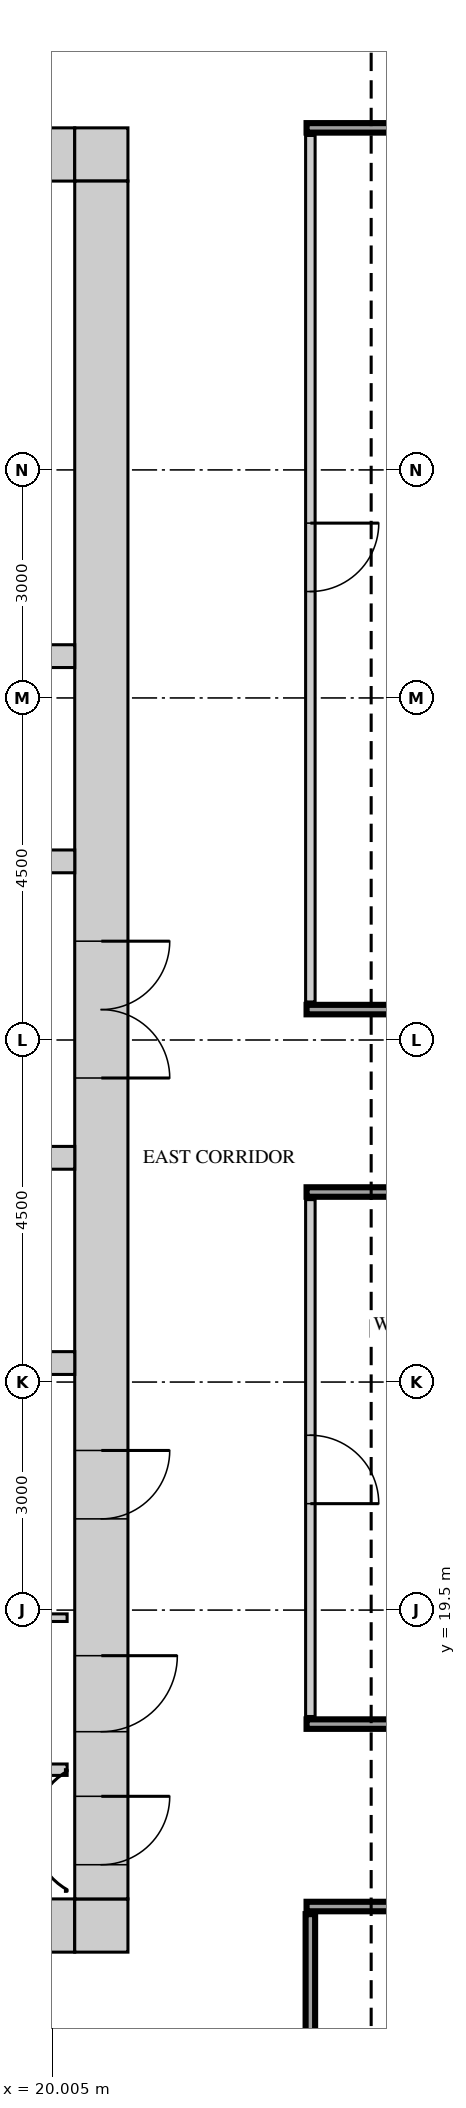
"""IFC4 building model, lengths in metres.
Left out: names, types, materials, properties, quantities, classifications, styles, units other than length and angle.
Written with IfcOpenShell. Run it as: python <this file> out.ifc"""

import sys

from ifc_helpers import new_model, si_unit, direction, frame, frame_2d, origin, place, context, subcontext, project, spatial, rectangle, extrude, source, transform, mapped, element, fill, save


model = new_model("IFC4")
c1 = context("Model", 3, precision=1e-05, world=origin(), true_north=direction((0.0, 1.0)))
c2 = subcontext(c1, "Body", "Model", "MODEL_VIEW")
j1 = project(units=[si_unit("LENGTHUNIT", "METRE"), si_unit("PLANEANGLEUNIT", "RADIAN")], contexts=[c1])
p1 = place(None, origin())
s1 = spatial("IfcSite", under=j1, at=p1, CompositionType="ELEMENT")
p2 = place(p1, origin())
s2 = spatial("IfcBuilding", under=s1, at=p2, CompositionType="ELEMENT")
p3 = place(p2, frame((0.0, 0.0, 242.2)))
s3 = spatial("IfcBuildingStorey", under=s2, at=p3, CompositionType="ELEMENT", Elevation=242.2)
m1 = source(origin(), c2, "Body", "SweptSolid", [
    extrude(rectangle(XDim=13.6, YDim=0.7, at=frame_2d((6.8, 0.0))), origin(), (0.0, 0.0, 1.0), 3.75),
])
p4 = place(p3, frame((6.7, 38.65, 0.0), z_axis=(0.0, 0.0, 1.0), x_axis=(1.0, 0.0, 0.0)))
e1 = element("IfcWall", 1, at=p4, inside=s3, PredefinedType="SHEAR", context=c2, shape_type="MappedRepresentation", body=[
    mapped(m1, transform((0.0, 0.0, 0.0))),
])
m2 = source(origin(), c2, "Body", "SweptSolid", [
    extrude(rectangle(XDim=0.9, YDim=2.1, at=frame_2d((0.45, 1.05))), frame((0.0, 0.36, 0.0), z_axis=(0.0, -1.0, 0.0), x_axis=(1.0, 0.0, 0.0)), (0.0, 0.0, 1.0), 0.72),
])
p5 = place(p4, frame((1.85, 0.0, 0.0)))
e2 = element("IfcOpeningElement", 2, at=p5, cuts=e1, PredefinedType="OPENING", context=c2, shape_type="MappedRepresentation", body=[
    mapped(m2, transform((0.0, 0.0, 0.0))),
])
p6 = place(p4, frame((6.3, 0.0, 0.0)))
e3 = element("IfcOpeningElement", 3, at=p6, cuts=e1, PredefinedType="OPENING", context=c2, shape_type="MappedRepresentation", body=[
    mapped(m2, transform((0.0, 0.0, 0.0))),
])
p7 = place(p4, frame((10.8, 0.0, 0.0)))
e4 = element("IfcOpeningElement", 4, at=p7, cuts=e1, PredefinedType="OPENING", context=c2, shape_type="MappedRepresentation", body=[
    mapped(m2, transform((0.0, 0.0, 0.0))),
])
m3 = source(origin(), c2, "Body", "SweptSolid", [
    extrude(rectangle(XDim=0.7, YDim=0.7, at=frame_2d((0.35, 0.0))), origin(), (0.0, 0.0, 1.0), 3.75),
])
p8 = place(p3, frame((20.3, 38.65, 0.0), z_axis=(0.0, 0.0, 1.0), x_axis=(1.0, 0.0, 0.0)))
e5 = element("IfcWall", 5, at=p8, inside=s3, PredefinedType="SHEAR", context=c2, shape_type="MappedRepresentation", body=[
    mapped(m3, transform((0.0, 0.0, 0.0))),
])
p9 = place(p3, frame((6.7, 15.35, 0.0), z_axis=(0.0, 0.0, 1.0), x_axis=(1.0, 0.0, 0.0)))
e6 = element("IfcWall", 6, at=p9, inside=s3, PredefinedType="SHEAR", context=c2, shape_type="MappedRepresentation", body=[
    mapped(m1, transform((0.0, 0.0, 0.0))),
])
m4 = source(origin(), c2, "Body", "SweptSolid", [
    extrude(rectangle(XDim=1.2, YDim=2.1, at=frame_2d((0.6, 1.05))), frame((0.0, 0.36, 0.0), z_axis=(0.0, -1.0, 0.0), x_axis=(1.0, 0.0, 0.0)), (0.0, 0.0, 1.0), 0.72),
])
p10 = place(p9, frame((5.5, 0.0, 0.0)))
e7 = element("IfcOpeningElement", 7, at=p10, cuts=e6, PredefinedType="OPENING", context=c2, shape_type="MappedRepresentation", body=[
    mapped(m4, transform((0.0, 0.0, 0.0))),
])
p11 = place(p9, frame((2.15, 0.0, 0.0)))
e8 = element("IfcOpeningElement", 8, at=p11, cuts=e6, PredefinedType="OPENING", context=c2, shape_type="MappedRepresentation", body=[
    mapped(m4, transform((0.0, 0.0, 0.0))),
])
m5 = source(origin(), c2, "Body", "SweptSolid", [
    extrude(rectangle(XDim=1.0, YDim=2.1, at=frame_2d((0.5, 1.05))), frame((0.0, 0.36, 0.0), z_axis=(0.0, -1.0, 0.0), x_axis=(1.0, 0.0, 0.0)), (0.0, 0.0, 1.0), 0.72),
])
p12 = place(p9, frame((8.0, 0.0, 0.0)))
e9 = element("IfcOpeningElement", 9, at=p12, cuts=e6, PredefinedType="OPENING", context=c2, shape_type="MappedRepresentation", body=[
    mapped(m5, transform((0.0, 0.0, 0.0))),
])
p13 = place(p3, frame((20.3, 15.35, 0.0), z_axis=(0.0, 0.0, 1.0), x_axis=(1.0, 0.0, 0.0)))
e10 = element("IfcWall", 10, at=p13, inside=s3, PredefinedType="SHEAR", context=c2, shape_type="MappedRepresentation", body=[
    mapped(m3, transform((0.0, 0.0, 0.0))),
])
m6 = source(origin(), c2, "Body", "SweptSolid", [
    extrude(rectangle(XDim=22.6, YDim=0.7, at=frame_2d((11.3, 0.0))), origin(), (0.0, 0.0, 1.0), 3.75),
])
p14 = place(p3, frame((20.65, 15.7, 0.0), z_axis=(0.0, 0.0, 1.0), x_axis=(0.0, 1.0, 0.0)))
e11 = element("IfcWall", 11, at=p14, inside=s3, PredefinedType="SHEAR", context=c2, shape_type="MappedRepresentation", body=[
    mapped(m6, transform((0.0, 0.0, 0.0))),
])
m7 = source(origin(), c2, "Body", "SweptSolid", [
    extrude(rectangle(XDim=1.8, YDim=2.1, at=frame_2d((0.9, 1.05))), frame((0.0, 0.36, 0.0), z_axis=(0.0, -1.0, 0.0), x_axis=(1.0, 0.0, 0.0)), (0.0, 0.0, 1.0), 0.72),
])
p15 = place(p14, frame((10.8, 0.0, 0.0)))
e12 = element("IfcOpeningElement", 12, at=p15, cuts=e11, PredefinedType="OPENING", context=c2, shape_type="MappedRepresentation", body=[
    mapped(m7, transform((0.0, 0.0, 0.0))),
])
p16 = place(p14, frame((0.45, 0.0, 0.0)))
e13 = element("IfcOpeningElement", 13, at=p16, cuts=e11, PredefinedType="OPENING", context=c2, shape_type="MappedRepresentation", body=[
    mapped(m2, transform((0.0, 0.0, 0.0))),
])
p17 = place(p14, frame((2.2, 0.0, 0.0)))
e14 = element("IfcOpeningElement", 14, at=p17, cuts=e11, PredefinedType="OPENING", context=c2, shape_type="MappedRepresentation", body=[
    mapped(m5, transform((0.0, 0.0, 0.0))),
])
p18 = place(p14, frame((5.0, 0.0, 0.0)))
e15 = element("IfcOpeningElement", 15, at=p18, cuts=e11, PredefinedType="OPENING", context=c2, shape_type="MappedRepresentation", body=[
    mapped(m2, transform((0.0, 0.0, 0.0))),
])
m8 = source(origin(), c2, "Body", "SweptSolid", [
    extrude(rectangle(XDim=13.6, YDim=0.3, at=frame_2d((6.8, 0.0))), origin(), (0.0, 0.0, 1.0), 3.75),
])
for number, where, z_axis, x_axis in (
    (16, (6.7, 22.75, 0.0), (0.0, 0.0, 1.0), (1.0, 0.0, 0.0)),
    (17, (6.7, 32.05, 0.0), (0.0, 0.0, 1.0), (1.0, 0.0, 0.0)),
):
    element("IfcWall", number, at=place(p3, frame(where, z_axis=z_axis, x_axis=x_axis)), inside=s3, PredefinedType="STANDARD", context=c2, shape_type="MappedRepresentation", body=[
        mapped(m8, transform((0.0, 0.0, 0.0))),
    ])
p19 = place(p3, frame((6.7, 29.35, 0.0), z_axis=(0.0, 0.0, 1.0), x_axis=(1.0, 0.0, 0.0)))
e18 = element("IfcWall", 18, at=p19, inside=s3, PredefinedType="STANDARD", context=c2, shape_type="MappedRepresentation", body=[
    mapped(m8, transform((0.0, 0.0, 0.0))),
])
m9 = source(origin(), c2, "Body", "SweptSolid", [
    extrude(rectangle(XDim=1.2, YDim=2.1, at=frame_2d((0.6, 1.05))), frame((0.0, 0.16, 0.0), z_axis=(0.0, -1.0, 0.0), x_axis=(1.0, 0.0, 0.0)), (0.0, 0.0, 1.0), 0.32),
])
p20 = place(p19, frame((1.05, 0.0, 0.0)))
e19 = element("IfcOpeningElement", 19, at=p20, cuts=e18, PredefinedType="OPENING", context=c2, shape_type="MappedRepresentation", body=[
    mapped(m9, transform((0.0, 0.0, 0.0))),
])
p21 = place(p19, frame((3.6, 0.0, 0.0)))
e20 = element("IfcOpeningElement", 20, at=p21, cuts=e18, PredefinedType="OPENING", context=c2, shape_type="MappedRepresentation", body=[
    mapped(m9, transform((0.0, 0.0, 0.0))),
])
p22 = place(p19, frame((6.15, 0.0, 0.0)))
e21 = element("IfcOpeningElement", 21, at=p22, cuts=e18, PredefinedType="OPENING", context=c2, shape_type="MappedRepresentation", body=[
    mapped(m9, transform((0.0, 0.0, 0.0))),
])
p23 = place(p19, frame((8.7, 0.0, 0.0)))
e22 = element("IfcOpeningElement", 22, at=p23, cuts=e18, PredefinedType="OPENING", context=c2, shape_type="MappedRepresentation", body=[
    mapped(m9, transform((0.0, 0.0, 0.0))),
])
p24 = place(p19, frame((11.25, 0.0, 0.0)))
e23 = element("IfcOpeningElement", 23, at=p24, cuts=e18, PredefinedType="OPENING", context=c2, shape_type="MappedRepresentation", body=[
    mapped(m9, transform((0.0, 0.0, 0.0))),
])
p25 = place(p3, frame((6.7, 25.45, 0.0), z_axis=(0.0, 0.0, 1.0), x_axis=(1.0, 0.0, 0.0)))
e24 = element("IfcWall", 24, at=p25, inside=s3, PredefinedType="STANDARD", context=c2, shape_type="MappedRepresentation", body=[
    mapped(m8, transform((0.0, 0.0, 0.0))),
])
p26 = place(p25, frame((1.05, 0.0, 0.0)))
e25 = element("IfcOpeningElement", 25, at=p26, cuts=e24, PredefinedType="OPENING", context=c2, shape_type="MappedRepresentation", body=[
    mapped(m9, transform((0.0, 0.0, 0.0))),
])
p27 = place(p25, frame((3.6, 0.0, 0.0)))
e26 = element("IfcOpeningElement", 26, at=p27, cuts=e24, PredefinedType="OPENING", context=c2, shape_type="MappedRepresentation", body=[
    mapped(m9, transform((0.0, 0.0, 0.0))),
])
p28 = place(p25, frame((6.15, 0.0, 0.0)))
e27 = element("IfcOpeningElement", 27, at=p28, cuts=e24, PredefinedType="OPENING", context=c2, shape_type="MappedRepresentation", body=[
    mapped(m9, transform((0.0, 0.0, 0.0))),
])
p29 = place(p25, frame((8.7, 0.0, 0.0)))
e28 = element("IfcOpeningElement", 28, at=p29, cuts=e24, PredefinedType="OPENING", context=c2, shape_type="MappedRepresentation", body=[
    mapped(m9, transform((0.0, 0.0, 0.0))),
])
p30 = place(p25, frame((11.25, 0.0, 0.0)))
e29 = element("IfcOpeningElement", 29, at=p30, cuts=e24, PredefinedType="OPENING", context=c2, shape_type="MappedRepresentation", body=[
    mapped(m9, transform((0.0, 0.0, 0.0))),
])
m10 = source(origin(), c2, "Body", "SweptSolid", [
    extrude(rectangle(XDim=10.85, YDim=0.125, at=frame_2d((5.425, 0.0))), origin(), (0.0, 0.0, 1.0), 3.8),
])
p31 = place(p3, frame((23.4, 4.65, 0.0), z_axis=(0.0, 0.0, 1.0), x_axis=(0.0, 1.0, 0.0)))
e30 = element("IfcWall", 30, at=p31, inside=s3, PredefinedType="PARTITIONING", context=c2, shape_type="MappedRepresentation", body=[
    mapped(m10, transform((0.0, 0.0, 0.0))),
])
m11 = source(origin(), c2, "Body", "SweptSolid", [
    extrude(rectangle(XDim=26.0, YDim=0.125, at=frame_2d((13.0, 0.0))), origin(), (0.0, 0.0, 1.0), 3.8),
])
p32 = place(p3, frame((23.35, 15.6, 0.0), z_axis=(0.0, 0.0, 1.0), x_axis=(1.0, 0.0, 0.0)))
e31 = element("IfcWall", 31, at=p32, inside=s3, PredefinedType="PARTITIONING", context=c2, shape_type="MappedRepresentation", body=[
    mapped(m11, transform((0.0, 0.0, 0.0))),
])
m12 = source(origin(), c2, "Body", "SweptSolid", [
    extrude(rectangle(XDim=1.2, YDim=2.1, at=frame_2d((0.6, 1.05))), frame((0.0, 0.073, 0.0), z_axis=(0.0, -1.0, 0.0), x_axis=(1.0, 0.0, 0.0)), (0.0, 0.0, 1.0), 0.145),
])
p33 = place(p32, frame((5.0, 0.0, 0.0)))
e32 = element("IfcOpeningElement", 32, at=p33, cuts=e31, PredefinedType="OPENING", context=c2, shape_type="MappedRepresentation", body=[
    mapped(m12, transform((0.0, 0.0, 0.0))),
])
m13 = source(origin(), c2, "Body", "SweptSolid", [
    extrude(rectangle(XDim=0.9, YDim=2.1, at=frame_2d((0.45, 1.05))), frame((0.0, 0.073, 0.0), z_axis=(0.0, -1.0, 0.0), x_axis=(1.0, 0.0, 0.0)), (0.0, 0.0, 1.0), 0.145),
])
p34 = place(p32, frame((15.1, 0.0, 0.0)))
e33 = element("IfcOpeningElement", 33, at=p34, cuts=e31, PredefinedType="OPENING", context=c2, shape_type="MappedRepresentation", body=[
    mapped(m13, transform((0.0, 0.0, 0.0))),
])
p35 = place(p32, frame((22.6, 0.0, 0.0)))
e34 = element("IfcOpeningElement", 34, at=p35, cuts=e31, PredefinedType="OPENING", context=c2, shape_type="MappedRepresentation", body=[
    mapped(m13, transform((0.0, 0.0, 0.0))),
])
m14 = source(origin(), c2, "Body", "SweptSolid", [
    extrude(rectangle(XDim=4.0, YDim=0.15, at=frame_2d((2.0, 0.0))), origin(), (0.0, 0.0, 1.0), 3.8),
])
p36 = place(p3, frame((16.2, 17.4, 0.0), z_axis=(0.0, 0.0, 1.0), x_axis=(1.0, 0.0, 0.0)))
e35 = element("IfcWall", 35, at=p36, inside=s3, PredefinedType="PARTITIONING", context=c2, shape_type="MappedRepresentation", body=[
    mapped(m14, transform((0.0, 0.0, 0.0))),
])
p37 = place(p3, frame((23.35, 18.0, 0.0), z_axis=(0.0, 0.0, 1.0), x_axis=(1.0, 0.0, 0.0)))
e36 = element("IfcWall", 36, at=p37, inside=s3, PredefinedType="PARTITIONING", context=c2, shape_type="MappedRepresentation", body=[
    mapped(m11, transform((0.0, 0.0, 0.0))),
])
p38 = place(p37, frame((4.05, 0.0, 0.0)))
e37 = element("IfcOpeningElement", 37, at=p38, cuts=e36, PredefinedType="OPENING", context=c2, shape_type="MappedRepresentation", body=[
    mapped(m13, transform((0.0, 0.0, 0.0))),
])
m15 = source(origin(), c2, "Body", "SweptSolid", [
    extrude(rectangle(XDim=1.0, YDim=2.1, at=frame_2d((0.5, 1.05))), frame((0.0, 0.073, 0.0), z_axis=(0.0, -1.0, 0.0), x_axis=(1.0, 0.0, 0.0)), (0.0, 0.0, 1.0), 0.145),
])
p39 = place(p37, frame((7.4, 0.0, 0.0)))
e38 = element("IfcOpeningElement", 38, at=p39, cuts=e36, PredefinedType="OPENING", context=c2, shape_type="MappedRepresentation", body=[
    mapped(m15, transform((0.0, 0.0, 0.0))),
])
p40 = place(p37, frame((12.55, 0.0, 0.0)))
e39 = element("IfcOpeningElement", 39, at=p40, cuts=e36, PredefinedType="OPENING", context=c2, shape_type="MappedRepresentation", body=[
    mapped(m13, transform((0.0, 0.0, 0.0))),
])
p41 = place(p37, frame((20.8, 0.0, 0.0)))
e40 = element("IfcOpeningElement", 40, at=p41, cuts=e36, PredefinedType="OPENING", context=c2, shape_type="MappedRepresentation", body=[
    mapped(m13, transform((0.0, 0.0, 0.0))),
])
m16 = source(origin(), c2, "Body", "SweptSolid", [
    extrude(rectangle(XDim=6.8, YDim=0.125, at=frame_2d((3.4, 0.0))), origin(), (0.0, 0.0, 1.0), 3.8),
])
p42 = place(p3, frame((23.4, 18.1, 0.0), z_axis=(0.0, 0.0, 1.0), x_axis=(0.0, 1.0, 0.0)))
e41 = element("IfcWall", 41, at=p42, inside=s3, PredefinedType="PARTITIONING", context=c2, shape_type="MappedRepresentation", body=[
    mapped(m16, transform((0.0, 0.0, 0.0))),
])
p43 = place(p42, frame((2.8, 0.0, 0.0)))
e42 = element("IfcOpeningElement", 42, at=p43, cuts=e41, PredefinedType="OPENING", context=c2, shape_type="MappedRepresentation", body=[
    mapped(m13, transform((0.0, 0.0, 0.0))),
])
m17 = source(origin(), c2, "Body", "SweptSolid", [
    extrude(rectangle(XDim=4.1, YDim=0.1, at=frame_2d((2.05, 0.0))), origin(), (0.0, 0.0, 1.0), 3.8),
])
p44 = place(p3, frame((16.1, 19.4, 0.0), z_axis=(0.0, 0.0, 1.0), x_axis=(1.0, 0.0, 0.0)))
e43 = element("IfcWall", 43, at=p44, inside=s3, PredefinedType="PARTITIONING", context=c2, shape_type="MappedRepresentation", body=[
    mapped(m17, transform((0.0, 0.0, 0.0))),
])
p45 = place(p3, frame((23.35, 25.0, 0.0), z_axis=(0.0, 0.0, 1.0), x_axis=(1.0, 0.0, 0.0)))
e44 = element("IfcWall", 44, at=p45, inside=s3, PredefinedType="PARTITIONING", context=c2, shape_type="MappedRepresentation", body=[
    mapped(m11, transform((0.0, 0.0, 0.0))),
])
p46 = place(p3, frame((23.35, 27.4, 0.0), z_axis=(0.0, 0.0, 1.0), x_axis=(1.0, 0.0, 0.0)))
e45 = element("IfcWall", 45, at=p46, inside=s3, PredefinedType="PARTITIONING", context=c2, shape_type="MappedRepresentation", body=[
    mapped(m11, transform((0.0, 0.0, 0.0))),
])
p47 = place(p46, frame((13.0, 0.0, 0.0)))
e46 = element("IfcOpeningElement", 46, at=p47, cuts=e45, PredefinedType="OPENING", context=c2, shape_type="MappedRepresentation", body=[
    mapped(m12, transform((0.0, 0.0, 0.0))),
])
p48 = place(p46, frame((22.6, 0.0, 0.0)))
e47 = element("IfcOpeningElement", 47, at=p48, cuts=e45, PredefinedType="OPENING", context=c2, shape_type="MappedRepresentation", body=[
    mapped(m13, transform((0.0, 0.0, 0.0))),
])
m18 = source(origin(), c2, "Body", "SweptSolid", [
    extrude(rectangle(XDim=11.4, YDim=0.125, at=frame_2d((5.7, 0.0))), origin(), (0.0, 0.0, 1.0), 3.8),
])
p49 = place(p3, frame((23.4, 27.5, 0.0), z_axis=(0.0, 0.0, 1.0), x_axis=(0.0, 1.0, 0.0)))
e48 = element("IfcWall", 48, at=p49, inside=s3, PredefinedType="PARTITIONING", context=c2, shape_type="MappedRepresentation", body=[
    mapped(m18, transform((0.0, 0.0, 0.0))),
])
p50 = place(p49, frame((5.4, 0.0, 0.0)))
e49 = element("IfcOpeningElement", 49, at=p50, cuts=e48, PredefinedType="OPENING", context=c2, shape_type="MappedRepresentation", body=[
    mapped(m13, transform((0.0, 0.0, 0.0))),
])
m19 = source(origin(), c2, "Body", "SweptSolid", [
    extrude(rectangle(XDim=7.1, YDim=0.125, at=frame_2d((3.55, 0.0))), origin(), (0.0, 0.0, 1.0), 3.8),
])
p51 = place(p3, frame((23.35, 39.0, 0.0), z_axis=(0.0, 0.0, 1.0), x_axis=(1.0, 0.0, 0.0)))
e50 = element("IfcWall", 50, at=p51, inside=s3, PredefinedType="PARTITIONING", context=c2, shape_type="MappedRepresentation", body=[
    mapped(m19, transform((0.0, 0.0, 0.0))),
])
m20 = source(origin(), c2, "Body", "SweptSolid", [
    extrude(rectangle(XDim=1.8, YDim=2.1, at=frame_2d((0.9, 1.05))), frame((0.0, 0.3, 0.0), z_axis=(0.0, -1.0, 0.0), x_axis=(1.0, 0.0, 0.0)), (0.0, 0.0, 1.0), 0.6),
])
p52 = place(p15, origin())
e51 = element("IfcDoor", 51, at=p52, inside=s3, OperationType="DOUBLE_DOOR_SINGLE_SWING", PredefinedType="DOOR", context=c2, shape_type="MappedRepresentation", body=[
    mapped(m20, transform((0.0, 0.0, 0.0))),
])
fill(e12, e51)
m21 = source(origin(), c2, "Body", "SweptSolid", [
    extrude(rectangle(XDim=0.9, YDim=2.1, at=frame_2d((0.45, 1.05))), frame((0.0, 0.3, 0.0), z_axis=(0.0, -1.0, 0.0), x_axis=(1.0, 0.0, 0.0)), (0.0, 0.0, 1.0), 0.6),
])
p53 = place(p16, origin())
e52 = element("IfcDoor", 52, at=p53, inside=s3, OperationType="SINGLE_SWING_RIGHT", PredefinedType="DOOR", context=c2, shape_type="MappedRepresentation", body=[
    mapped(m21, transform((0.0, 0.0, 0.0))),
])
fill(e13, e52)
m22 = source(origin(), c2, "Body", "SweptSolid", [
    extrude(rectangle(XDim=1.0, YDim=2.1, at=frame_2d((0.5, 1.05))), frame((0.0, 0.3, 0.0), z_axis=(0.0, -1.0, 0.0), x_axis=(1.0, 0.0, 0.0)), (0.0, 0.0, 1.0), 0.6),
])
p54 = place(p17, origin())
e53 = element("IfcDoor", 53, at=p54, inside=s3, OperationType="SINGLE_SWING_RIGHT", PredefinedType="DOOR", context=c2, shape_type="MappedRepresentation", body=[
    mapped(m22, transform((0.0, 0.0, 0.0))),
])
fill(e14, e53)
p55 = place(p18, origin())
e54 = element("IfcDoor", 54, at=p55, inside=s3, OperationType="SINGLE_SWING_RIGHT", PredefinedType="DOOR", context=c2, shape_type="MappedRepresentation", body=[
    mapped(m21, transform((0.0, 0.0, 0.0))),
])
fill(e15, e54)
m23 = source(origin(), c2, "Body", "SweptSolid", [
    extrude(rectangle(XDim=0.9, YDim=2.1, at=frame_2d((0.45, 1.05))), frame((0.0, 0.025, 0.0), z_axis=(0.0, -1.0, 0.0), x_axis=(1.0, 0.0, 0.0)), (0.0, 0.0, 1.0), 0.05),
])
p56 = place(p43, origin())
e55 = element("IfcDoor", 55, at=p56, inside=s3, OperationType="SINGLE_SWING_LEFT", PredefinedType="DOOR", context=c2, shape_type="MappedRepresentation", body=[
    mapped(m23, transform((0.0, 0.0, 0.0))),
])
fill(e42, e55)
p57 = place(p50, origin())
e56 = element("IfcDoor", 56, at=p57, inside=s3, OperationType="SINGLE_SWING_RIGHT", PredefinedType="DOOR", context=c2, shape_type="MappedRepresentation", body=[
    mapped(m23, transform((0.0, 0.0, 0.0))),
])
fill(e49, e56)
save(model, sys.argv[1])
